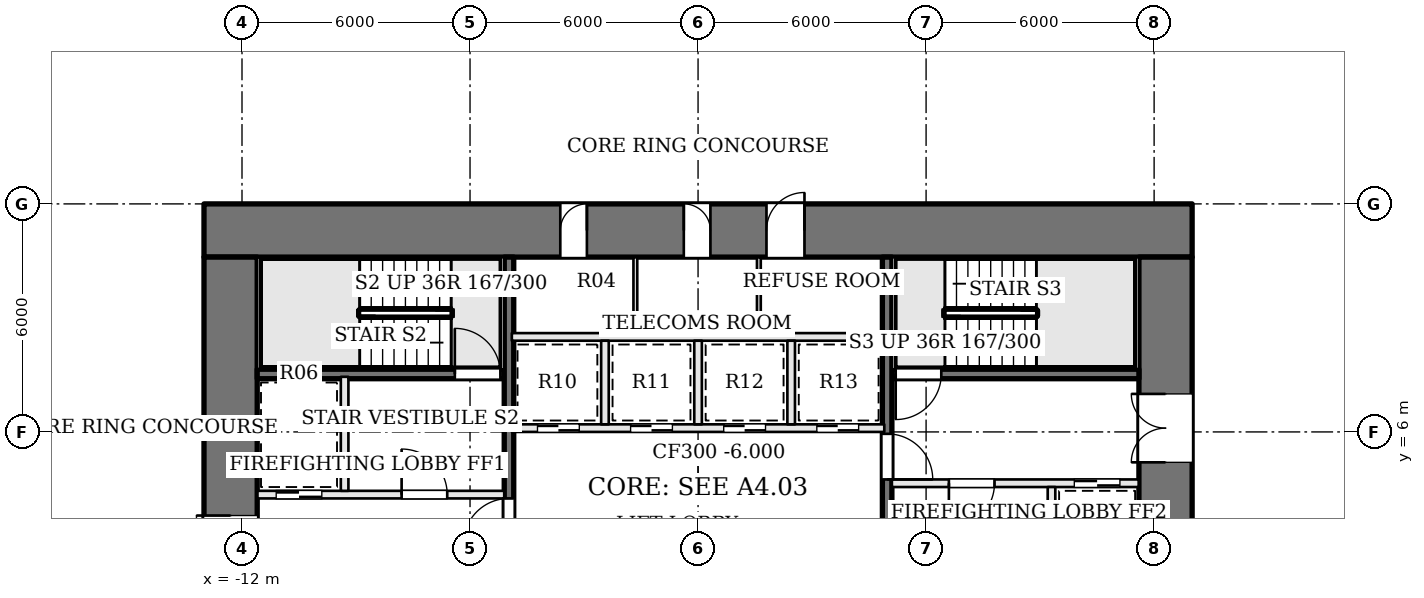
"""IFC4 building model, lengths in metres.
Left out: names, types, materials, properties, quantities, classifications, styles, units other than length and angle.
Written with IfcOpenShell. Run it as: python <this file> out.ifc"""

import sys

from ifc_helpers import new_model, si_unit, direction, frame, frame_2d, origin, place, context, subcontext, project, spatial, rectangle, extrude, element, fill, save


model = new_model("IFC4")
c1 = context("Model", 3, precision=1e-05, world=origin(), true_north=direction((0.0, 1.0)))
c2 = subcontext(c1, "Body", "Model", "MODEL_VIEW")
j1 = project(units=[si_unit("LENGTHUNIT", "METRE"), si_unit("PLANEANGLEUNIT", "RADIAN")], contexts=[c1])
p1 = place(None, origin())
s1 = spatial("IfcSite", under=j1, at=p1, CompositionType="ELEMENT")
p2 = place(p1, origin())
s2 = spatial("IfcBuilding", under=s1, at=p2, CompositionType="ELEMENT")
p3 = place(p2, frame((0.0, 0.0, -6.0)))
s3 = spatial("IfcBuildingStorey", under=s2, at=p3, CompositionType="ELEMENT", Elevation=-6.0)
p4 = place(p3, frame((-13.0, 11.3, 0.0), z_axis=(0.0, 0.0, 1.0), x_axis=(1.0, 0.0, 0.0)))
e1 = element("IfcWall", 1, at=p4, inside=s3, PredefinedType="SHEAR", context=c2, shape_type="SweptSolid", body=[
    extrude(rectangle(XDim=26.0, YDim=1.4, at=frame_2d((13.0, 0.0))), origin(), (0.0, 0.0, 1.0), 6.0),
])
p5 = place(p4, frame((9.375, 0.0, 0.0)))
e2 = element("IfcOpeningElement", 2, at=p5, cuts=e1, PredefinedType="OPENING", context=c2, shape_type="SweptSolid", body=[
    extrude(rectangle(XDim=0.7, YDim=2.1, at=frame_2d((0.35, 1.05))), frame((0.0, 0.71, 0.0), z_axis=(0.0, -1.0, 0.0), x_axis=(1.0, 0.0, 0.0)), (0.0, 0.0, 1.0), 1.42),
])
p6 = place(p4, frame((12.625, 0.0, 0.0)))
e3 = element("IfcOpeningElement", 3, at=p6, cuts=e1, PredefinedType="OPENING", context=c2, shape_type="SweptSolid", body=[
    extrude(rectangle(XDim=0.7, YDim=2.1, at=frame_2d((0.35, 1.05))), frame((0.0, 0.71, 0.0), z_axis=(0.0, -1.0, 0.0), x_axis=(1.0, 0.0, 0.0)), (0.0, 0.0, 1.0), 1.42),
])
p7 = place(p4, frame((14.8, 0.0, 0.0)))
e4 = element("IfcOpeningElement", 4, at=p7, cuts=e1, PredefinedType="OPENING", context=c2, shape_type="SweptSolid", body=[
    extrude(rectangle(XDim=1.0, YDim=2.1, at=frame_2d((0.5, 1.05))), frame((0.0, 0.71, 0.0), z_axis=(0.0, -1.0, 0.0), x_axis=(1.0, 0.0, 0.0)), (0.0, 0.0, 1.0), 1.42),
])
p8 = place(p3, frame((12.3, -1.6, 0.0), z_axis=(0.0, 0.0, 1.0), x_axis=(0.0, 1.0, 0.0)))
e5 = element("IfcWall", 5, at=p8, inside=s3, PredefinedType="SHEAR", context=c2, shape_type="SweptSolid", body=[
    extrude(rectangle(XDim=12.2, YDim=1.4, at=frame_2d((6.1, 0.0))), origin(), (0.0, 0.0, 1.0), 6.0),
])
p9 = place(p8, frame((6.8, 0.0, 0.0)))
e6 = element("IfcOpeningElement", 6, at=p9, cuts=e5, PredefinedType="OPENING", context=c2, shape_type="SweptSolid", body=[
    extrude(rectangle(XDim=1.8, YDim=2.1, at=frame_2d((0.9, 1.05))), frame((0.0, 0.71, 0.0), z_axis=(0.0, -1.0, 0.0), x_axis=(1.0, 0.0, 0.0)), (0.0, 0.0, 1.0), 1.42),
])
p10 = place(p3, frame((-12.3, -1.6, 0.0), z_axis=(0.0, 0.0, 1.0), x_axis=(0.0, 1.0, 0.0)))
e7 = element("IfcWall", 7, at=p10, inside=s3, PredefinedType="SHEAR", context=c2, shape_type="SweptSolid", body=[
    extrude(rectangle(XDim=12.2, YDim=1.4, at=frame_2d((6.1, 0.0))), origin(), (0.0, 0.0, 1.0), 6.0),
])
p11 = place(p10, frame((3.6, 0.0, 0.0)))
e8 = element("IfcOpeningElement", 8, at=p11, cuts=e7, PredefinedType="OPENING", context=c2, shape_type="SweptSolid", body=[
    extrude(rectangle(XDim=1.8, YDim=2.1, at=frame_2d((0.9, 1.05))), frame((0.0, 0.71, 0.0), z_axis=(0.0, -1.0, 0.0), x_axis=(1.0, 0.0, 0.0)), (0.0, 0.0, 1.0), 1.42),
])
p12 = place(p3, frame((11.6, 7.525, 0.0), z_axis=(0.0, 0.0, 1.0), x_axis=(-1.0, 0.0, 0.0)))
e9 = element("IfcWall", 9, at=p12, inside=s3, PredefinedType="SOLIDWALL", context=c2, shape_type="SweptSolid", body=[
    extrude(rectangle(XDim=6.5, YDim=0.25, at=frame_2d((3.25, 0.0))), origin(), (0.0, 0.0, 1.0), 5.65),
])
p13 = place(p12, frame((5.2, 0.0, 0.0)))
e10 = element("IfcOpeningElement", 10, at=p13, cuts=e9, PredefinedType="OPENING", context=c2, shape_type="SweptSolid", body=[
    extrude(rectangle(XDim=1.2, YDim=2.1, at=frame_2d((0.6, 1.05))), frame((0.0, 0.135, 0.0), z_axis=(0.0, -1.0, 0.0), x_axis=(1.0, 0.0, 0.0)), (0.0, 0.0, 1.0), 0.27),
])
p14 = place(p3, frame((-11.6, 4.35, 0.0), z_axis=(0.0, 0.0, 1.0), x_axis=(1.0, 0.0, 0.0)))
e11 = element("IfcWall", 11, at=p14, inside=s3, PredefinedType="SOLIDWALL", context=c2, shape_type="SweptSolid", body=[
    extrude(rectangle(XDim=6.5, YDim=0.2, at=frame_2d((3.25, 0.0))), origin(), (0.0, 0.0, 1.0), 5.65),
])
p15 = place(p14, frame((3.8, 0.0, 0.0)))
e12 = element("IfcOpeningElement", 12, at=p15, cuts=e11, PredefinedType="OPENING", context=c2, shape_type="SweptSolid", body=[
    extrude(rectangle(XDim=1.2, YDim=2.1, at=frame_2d((0.6, 1.05))), frame((0.0, 0.11, 0.0), z_axis=(0.0, -1.0, 0.0), x_axis=(1.0, 0.0, 0.0)), (0.0, 0.0, 1.0), 0.22),
])
p16 = place(p14, frame((0.5, 0.0, 0.0)))
e13 = element("IfcOpeningElement", 13, at=p16, cuts=e11, PredefinedType="OPENING", context=c2, shape_type="SweptSolid", body=[
    extrude(rectangle(XDim=1.2, YDim=2.1, at=frame_2d((0.6, 1.05))), frame((0.0, 0.11, 0.0), z_axis=(0.0, -1.0, 0.0), x_axis=(1.0, 0.0, 0.0)), (0.0, 0.0, 1.0), 0.22),
])
p17 = place(p3, frame((11.6, 4.65, 0.0), z_axis=(0.0, 0.0, 1.0), x_axis=(-1.0, 0.0, 0.0)))
e14 = element("IfcWall", 14, at=p17, inside=s3, PredefinedType="SOLIDWALL", context=c2, shape_type="SweptSolid", body=[
    extrude(rectangle(XDim=6.5, YDim=0.2, at=frame_2d((3.25, 0.0))), origin(), (0.0, 0.0, 1.0), 5.65),
])
p18 = place(p17, frame((3.8, 0.0, 0.0)))
e15 = element("IfcOpeningElement", 15, at=p18, cuts=e14, PredefinedType="OPENING", context=c2, shape_type="SweptSolid", body=[
    extrude(rectangle(XDim=1.2, YDim=2.1, at=frame_2d((0.6, 1.05))), frame((0.0, 0.11, 0.0), z_axis=(0.0, -1.0, 0.0), x_axis=(1.0, 0.0, 0.0)), (0.0, 0.0, 1.0), 0.22),
])
p19 = place(p17, frame((0.5, 0.0, 0.0)))
e16 = element("IfcOpeningElement", 16, at=p19, cuts=e14, PredefinedType="OPENING", context=c2, shape_type="SweptSolid", body=[
    extrude(rectangle(XDim=1.2, YDim=2.1, at=frame_2d((0.6, 1.05))), frame((0.0, 0.11, 0.0), z_axis=(0.0, -1.0, 0.0), x_axis=(1.0, 0.0, 0.0)), (0.0, 0.0, 1.0), 0.22),
])
p20 = place(p3, frame((-11.6, 7.525, 0.0), z_axis=(0.0, 0.0, 1.0), x_axis=(1.0, 0.0, 0.0)))
e17 = element("IfcWall", 17, at=p20, inside=s3, PredefinedType="SOLIDWALL", context=c2, shape_type="SweptSolid", body=[
    extrude(rectangle(XDim=6.5, YDim=0.25, at=frame_2d((3.25, 0.0))), origin(), (0.0, 0.0, 1.0), 5.65),
])
p21 = place(p20, frame((5.2, 0.0, 0.0)))
e18 = element("IfcOpeningElement", 18, at=p21, cuts=e17, PredefinedType="OPENING", context=c2, shape_type="SweptSolid", body=[
    extrude(rectangle(XDim=1.2, YDim=2.1, at=frame_2d((0.6, 1.05))), frame((0.0, 0.135, 0.0), z_axis=(0.0, -1.0, 0.0), x_axis=(1.0, 0.0, 0.0)), (0.0, 0.0, 1.0), 0.27),
])
for number, where, z_axis, x_axis in (
    (19, (-9.3, 4.45, 0.0), (0.0, 0.0, 1.0), (0.0, 1.0, 0.0)),
    (20, (9.3, 4.55, 0.0), (0.0, 0.0, 1.0), (0.0, -1.0, 0.0)),
):
    element("IfcWall", number, at=place(p3, frame(where, z_axis=z_axis, x_axis=x_axis)), inside=s3, PredefinedType="SOLIDWALL", context=c2, shape_type="SweptSolid", body=[
        extrude(rectangle(XDim=3.0, YDim=0.2, at=frame_2d((1.5, 0.0))), origin(), (0.0, 0.0, 1.0), 5.65),
    ])
p22 = place(p3, frame((-4.975, -1.6, 0.0), z_axis=(0.0, 0.0, 1.0), x_axis=(0.0, 1.0, 0.0)))
e21 = element("IfcWall", 21, at=p22, inside=s3, PredefinedType="SOLIDWALL", context=c2, shape_type="SweptSolid", body=[
    extrude(rectangle(XDim=12.2, YDim=0.25, at=frame_2d((6.1, 0.0))), origin(), (0.0, 0.0, 1.0), 5.65),
])
p23 = place(p22, frame((4.65, 0.0, 0.0)))
e22 = element("IfcOpeningElement", 22, at=p23, cuts=e21, PredefinedType="OPENING", context=c2, shape_type="SweptSolid", body=[
    extrude(rectangle(XDim=1.2, YDim=2.1, at=frame_2d((0.6, 1.05))), frame((0.0, 0.135, 0.0), z_axis=(0.0, -1.0, 0.0), x_axis=(1.0, 0.0, 0.0)), (0.0, 0.0, 1.0), 0.27),
])
p24 = place(p3, frame((4.975, 10.6, 0.0), z_axis=(0.0, 0.0, 1.0), x_axis=(0.0, -1.0, 0.0)))
e23 = element("IfcWall", 23, at=p24, inside=s3, PredefinedType="SOLIDWALL", context=c2, shape_type="SweptSolid", body=[
    extrude(rectangle(XDim=12.2, YDim=0.25, at=frame_2d((6.1, 0.0))), origin(), (0.0, 0.0, 1.0), 5.65),
])
p25 = place(p24, frame((4.65, 0.0, 0.0)))
e24 = element("IfcOpeningElement", 24, at=p25, cuts=e23, PredefinedType="OPENING", context=c2, shape_type="SweptSolid", body=[
    extrude(rectangle(XDim=1.2, YDim=2.1, at=frame_2d((0.6, 1.05))), frame((0.0, 0.135, 0.0), z_axis=(0.0, -1.0, 0.0), x_axis=(1.0, 0.0, 0.0)), (0.0, 0.0, 1.0), 0.27),
])
p26 = place(p3, frame((-4.9, 6.1, 0.0), z_axis=(0.0, 0.0, 1.0), x_axis=(1.0, 0.0, 0.0)))
e25 = element("IfcWall", 25, at=p26, inside=s3, PredefinedType="SOLIDWALL", context=c2, shape_type="SweptSolid", body=[
    extrude(rectangle(XDim=9.8, YDim=0.2, at=frame_2d((4.9, 0.0))), origin(), (0.0, 0.0, 1.0), 5.65),
])
p27 = place(p26, frame((0.675, 0.0, 0.0)))
e26 = element("IfcOpeningElement", 26, at=p27, cuts=e25, PredefinedType="OPENING", context=c2, shape_type="SweptSolid", body=[
    extrude(rectangle(XDim=1.1, YDim=2.1, at=frame_2d((0.55, 1.05))), frame((0.0, 0.11, 0.0), z_axis=(0.0, -1.0, 0.0), x_axis=(1.0, 0.0, 0.0)), (0.0, 0.0, 1.0), 0.22),
])
p28 = place(p26, frame((3.125, 0.0, 0.0)))
e27 = element("IfcOpeningElement", 27, at=p28, cuts=e25, PredefinedType="OPENING", context=c2, shape_type="SweptSolid", body=[
    extrude(rectangle(XDim=1.1, YDim=2.1, at=frame_2d((0.55, 1.05))), frame((0.0, 0.11, 0.0), z_axis=(0.0, -1.0, 0.0), x_axis=(1.0, 0.0, 0.0)), (0.0, 0.0, 1.0), 0.22),
])
p29 = place(p26, frame((5.575, 0.0, 0.0)))
e28 = element("IfcOpeningElement", 28, at=p29, cuts=e25, PredefinedType="OPENING", context=c2, shape_type="SweptSolid", body=[
    extrude(rectangle(XDim=1.1, YDim=2.1, at=frame_2d((0.55, 1.05))), frame((0.0, 0.11, 0.0), z_axis=(0.0, -1.0, 0.0), x_axis=(1.0, 0.0, 0.0)), (0.0, 0.0, 1.0), 0.22),
])
p30 = place(p26, frame((8.025, 0.0, 0.0)))
e29 = element("IfcOpeningElement", 29, at=p30, cuts=e25, PredefinedType="OPENING", context=c2, shape_type="SweptSolid", body=[
    extrude(rectangle(XDim=1.1, YDim=2.1, at=frame_2d((0.55, 1.05))), frame((0.0, 0.11, 0.0), z_axis=(0.0, -1.0, 0.0), x_axis=(1.0, 0.0, 0.0)), (0.0, 0.0, 1.0), 0.22),
])
p31 = place(p3, frame((-4.9, 8.5, 0.0), z_axis=(0.0, 0.0, 1.0), x_axis=(1.0, 0.0, 0.0)))
e30 = element("IfcWall", 30, at=p31, inside=s3, PredefinedType="SOLIDWALL", context=c2, shape_type="SweptSolid", body=[
    extrude(rectangle(XDim=9.8, YDim=0.2, at=frame_2d((4.9, 0.0))), origin(), (0.0, 0.0, 1.0), 5.65),
])
for number, where, z_axis, x_axis in (
    (31, (-2.45, 6.2, 0.0), (0.0, 0.0, 1.0), (0.0, 1.0, 0.0)),
    (32, (0.0, 6.2, 0.0), (0.0, 0.0, 1.0), (0.0, 1.0, 0.0)),
    (33, (2.45, 6.2, 0.0), (0.0, 0.0, 1.0), (0.0, 1.0, 0.0)),
):
    element("IfcWall", number, at=place(p3, frame(where, z_axis=z_axis, x_axis=x_axis)), inside=s3, PredefinedType="SOLIDWALL", context=c2, shape_type="SweptSolid", body=[
        extrude(rectangle(XDim=2.2, YDim=0.2, at=frame_2d((1.1, 0.0))), origin(), (0.0, 0.0, 1.0), 5.65),
    ])
for number, where, z_axis, x_axis in (
    (34, (-1.65, 8.6, 0.0), (0.0, 0.0, 1.0), (0.0, 1.0, 0.0)),
    (35, (1.6, 8.6, 0.0), (0.0, 0.0, 1.0), (0.0, 1.0, 0.0)),
):
    element("IfcWall", number, at=place(p3, frame(where, z_axis=z_axis, x_axis=x_axis)), inside=s3, PredefinedType="PARTITIONING", context=c2, shape_type="SweptSolid", body=[
        extrude(rectangle(XDim=2.0, YDim=0.1, at=frame_2d((1.0, 0.0))), origin(), (0.0, 0.0, 1.0), 5.65),
    ])
p32 = place(p11, origin())
e36 = element("IfcDoor", 36, at=p32, inside=s3, OperationType="DOUBLE_DOOR_SINGLE_SWING", PredefinedType="DOOR", context=c2, shape_type="SweptSolid", body=[
    extrude(rectangle(XDim=1.8, YDim=2.1, at=frame_2d((0.9, 1.05))), frame((0.0, 0.025, 0.0), z_axis=(0.0, -1.0, 0.0), x_axis=(1.0, 0.0, 0.0)), (0.0, 0.0, 1.0), 0.05),
])
fill(e8, e36)
p33 = place(p9, origin())
e37 = element("IfcDoor", 37, at=p33, inside=s3, OperationType="DOUBLE_DOOR_SINGLE_SWING", PredefinedType="DOOR", context=c2, shape_type="SweptSolid", body=[
    extrude(rectangle(XDim=1.8, YDim=2.1, at=frame_2d((0.9, 1.05))), frame((0.0, 0.025, 0.0), z_axis=(0.0, -1.0, 0.0), x_axis=(1.0, 0.0, 0.0)), (0.0, 0.0, 1.0), 0.05),
])
fill(e6, e37)
p34 = place(p23, origin())
e38 = element("IfcDoor", 38, at=p34, inside=s3, OperationType="SINGLE_SWING_LEFT", PredefinedType="DOOR", context=c2, shape_type="SweptSolid", body=[
    extrude(rectangle(XDim=1.2, YDim=2.1, at=frame_2d((0.6, 1.05))), frame((0.0, 0.025, 0.0), z_axis=(0.0, -1.0, 0.0), x_axis=(1.0, 0.0, 0.0)), (0.0, 0.0, 1.0), 0.05),
])
fill(e22, e38)
p35 = place(p25, origin())
e39 = element("IfcDoor", 39, at=p35, inside=s3, OperationType="SINGLE_SWING_RIGHT", PredefinedType="DOOR", context=c2, shape_type="SweptSolid", body=[
    extrude(rectangle(XDim=1.2, YDim=2.1, at=frame_2d((0.6, 1.05))), frame((0.0, 0.025, 0.0), z_axis=(0.0, -1.0, 0.0), x_axis=(1.0, 0.0, 0.0)), (0.0, 0.0, 1.0), 0.05),
])
fill(e24, e39)
p36 = place(p15, origin())
e40 = element("IfcDoor", 40, at=p36, inside=s3, OperationType="SINGLE_SWING_LEFT", PredefinedType="DOOR", context=c2, shape_type="SweptSolid", body=[
    extrude(rectangle(XDim=1.2, YDim=2.1, at=frame_2d((0.6, 1.05))), frame((0.0, 0.025, 0.0), z_axis=(0.0, -1.0, 0.0), x_axis=(1.0, 0.0, 0.0)), (0.0, 0.0, 1.0), 0.05),
])
fill(e12, e40)
p37 = place(p18, origin())
e41 = element("IfcDoor", 41, at=p37, inside=s3, OperationType="SINGLE_SWING_RIGHT", PredefinedType="DOOR", context=c2, shape_type="SweptSolid", body=[
    extrude(rectangle(XDim=1.2, YDim=2.1, at=frame_2d((0.6, 1.05))), frame((0.0, 0.025, 0.0), z_axis=(0.0, -1.0, 0.0), x_axis=(1.0, 0.0, 0.0)), (0.0, 0.0, 1.0), 0.05),
])
fill(e15, e41)
p38 = place(p13, origin())
e42 = element("IfcDoor", 42, at=p38, inside=s3, OperationType="SINGLE_SWING_RIGHT", PredefinedType="DOOR", context=c2, shape_type="SweptSolid", body=[
    extrude(rectangle(XDim=1.2, YDim=2.1, at=frame_2d((0.6, 1.05))), frame((0.0, 0.025, 0.0), z_axis=(0.0, -1.0, 0.0), x_axis=(1.0, 0.0, 0.0)), (0.0, 0.0, 1.0), 0.05),
])
fill(e10, e42)
p39 = place(p21, origin())
e43 = element("IfcDoor", 43, at=p39, inside=s3, OperationType="SINGLE_SWING_LEFT", PredefinedType="DOOR", context=c2, shape_type="SweptSolid", body=[
    extrude(rectangle(XDim=1.2, YDim=2.1, at=frame_2d((0.6, 1.05))), frame((0.0, 0.025, 0.0), z_axis=(0.0, -1.0, 0.0), x_axis=(1.0, 0.0, 0.0)), (0.0, 0.0, 1.0), 0.05),
])
fill(e18, e43)
p40 = place(p16, origin())
e44 = element("IfcDoor", 44, at=p40, inside=s3, OperationType="SLIDING_TO_RIGHT", PredefinedType="DOOR", context=c2, shape_type="SweptSolid", body=[
    extrude(rectangle(XDim=1.2, YDim=2.1, at=frame_2d((0.6, 1.05))), frame((0.0, 0.025, 0.0), z_axis=(0.0, -1.0, 0.0), x_axis=(1.0, 0.0, 0.0)), (0.0, 0.0, 1.0), 0.05),
])
fill(e13, e44)
p41 = place(p19, origin())
e45 = element("IfcDoor", 45, at=p41, inside=s3, OperationType="SLIDING_TO_RIGHT", PredefinedType="DOOR", context=c2, shape_type="SweptSolid", body=[
    extrude(rectangle(XDim=1.2, YDim=2.1, at=frame_2d((0.6, 1.05))), frame((0.0, 0.025, 0.0), z_axis=(0.0, -1.0, 0.0), x_axis=(1.0, 0.0, 0.0)), (0.0, 0.0, 1.0), 0.05),
])
fill(e16, e45)
p42 = place(p27, origin())
e46 = element("IfcDoor", 46, at=p42, inside=s3, OperationType="SLIDING_TO_RIGHT", PredefinedType="DOOR", context=c2, shape_type="SweptSolid", body=[
    extrude(rectangle(XDim=1.1, YDim=2.1, at=frame_2d((0.55, 1.05))), frame((0.0, 0.025, 0.0), z_axis=(0.0, -1.0, 0.0), x_axis=(1.0, 0.0, 0.0)), (0.0, 0.0, 1.0), 0.05),
])
fill(e26, e46)
p43 = place(p28, origin())
e47 = element("IfcDoor", 47, at=p43, inside=s3, OperationType="SLIDING_TO_LEFT", PredefinedType="DOOR", context=c2, shape_type="SweptSolid", body=[
    extrude(rectangle(XDim=1.1, YDim=2.1, at=frame_2d((0.55, 1.05))), frame((0.0, 0.025, 0.0), z_axis=(0.0, -1.0, 0.0), x_axis=(1.0, 0.0, 0.0)), (0.0, 0.0, 1.0), 0.05),
])
fill(e27, e47)
p44 = place(p29, origin())
e48 = element("IfcDoor", 48, at=p44, inside=s3, OperationType="SLIDING_TO_RIGHT", PredefinedType="DOOR", context=c2, shape_type="SweptSolid", body=[
    extrude(rectangle(XDim=1.1, YDim=2.1, at=frame_2d((0.55, 1.05))), frame((0.0, 0.025, 0.0), z_axis=(0.0, -1.0, 0.0), x_axis=(1.0, 0.0, 0.0)), (0.0, 0.0, 1.0), 0.05),
])
fill(e28, e48)
p45 = place(p30, origin())
e49 = element("IfcDoor", 49, at=p45, inside=s3, OperationType="SLIDING_TO_LEFT", PredefinedType="DOOR", context=c2, shape_type="SweptSolid", body=[
    extrude(rectangle(XDim=1.1, YDim=2.1, at=frame_2d((0.55, 1.05))), frame((0.0, 0.025, 0.0), z_axis=(0.0, -1.0, 0.0), x_axis=(1.0, 0.0, 0.0)), (0.0, 0.0, 1.0), 0.05),
])
fill(e29, e49)
p46 = place(p5, origin())
e50 = element("IfcDoor", 50, at=p46, inside=s3, OperationType="SINGLE_SWING_RIGHT", PredefinedType="DOOR", context=c2, shape_type="SweptSolid", body=[
    extrude(rectangle(XDim=0.7, YDim=2.1, at=frame_2d((0.35, 1.05))), frame((0.0, 0.025, 0.0), z_axis=(0.0, -1.0, 0.0), x_axis=(1.0, 0.0, 0.0)), (0.0, 0.0, 1.0), 0.05),
])
fill(e2, e50)
p47 = place(p6, origin())
e51 = element("IfcDoor", 51, at=p47, inside=s3, OperationType="SINGLE_SWING_LEFT", PredefinedType="DOOR", context=c2, shape_type="SweptSolid", body=[
    extrude(rectangle(XDim=0.7, YDim=2.1, at=frame_2d((0.35, 1.05))), frame((0.0, 0.025, 0.0), z_axis=(0.0, -1.0, 0.0), x_axis=(1.0, 0.0, 0.0)), (0.0, 0.0, 1.0), 0.05),
])
fill(e3, e51)
p48 = place(p7, origin())
e52 = element("IfcDoor", 52, at=p48, inside=s3, OperationType="SINGLE_SWING_RIGHT", PredefinedType="DOOR", context=c2, shape_type="SweptSolid", body=[
    extrude(rectangle(XDim=1.0, YDim=2.1, at=frame_2d((0.5, 1.05))), frame((0.0, 0.025, 0.0), z_axis=(0.0, -1.0, 0.0), x_axis=(1.0, 0.0, 0.0)), (0.0, 0.0, 1.0), 0.05),
])
fill(e4, e52)
save(model, sys.argv[1])
